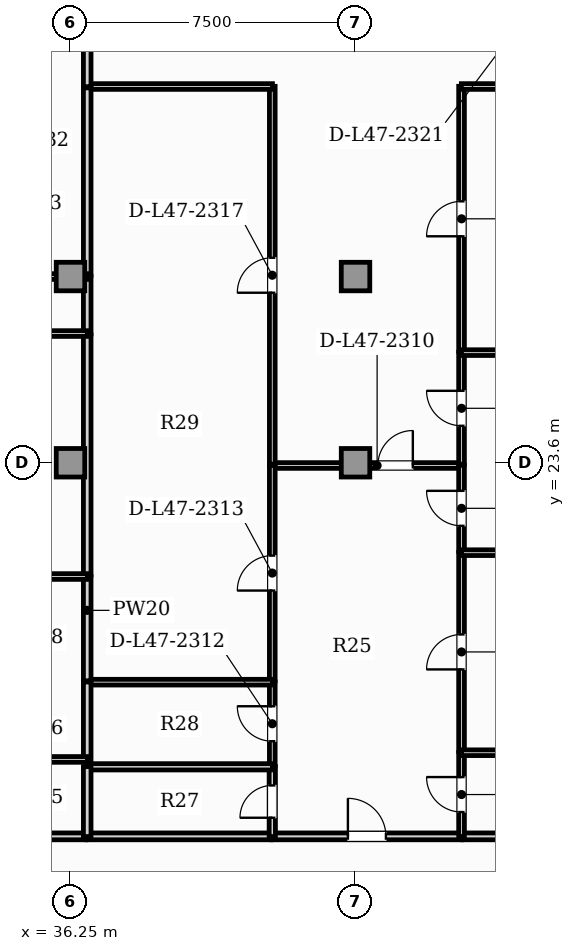
"""IFC4 building model, lengths in metres.
Left out: names, types, materials, properties, quantities, classifications, styles, units other than length and angle.
Written with IfcOpenShell. Run it as: python <this file> out.ifc"""

import sys

from ifc_helpers import new_model, si_unit, direction, frame, frame_2d, origin, origin_2d, place, context, subcontext, project, spatial, rectangle, extrude, element, fill, save


model = new_model("IFC4")
c1 = context("Model", 3, precision=1e-05, world=origin(), true_north=direction((0.0, 1.0)))
c2 = subcontext(c1, "Body", "Model", "MODEL_VIEW")
j1 = project(units=[si_unit("LENGTHUNIT", "METRE"), si_unit("PLANEANGLEUNIT", "RADIAN")], contexts=[c1])
p1 = place(None, origin())
s1 = spatial("IfcSite", under=j1, at=p1, CompositionType="ELEMENT")
p2 = place(p1, origin())
s2 = spatial("IfcBuilding", under=s1, at=p2, CompositionType="ELEMENT")
p3 = place(p2, frame((0.0, 0.0, 192.6)))
s3 = spatial("IfcBuildingStorey", under=s2, at=p3, CompositionType="ELEMENT", Elevation=192.6)
for number, where, z_axis, x_axis in (
    (1, (36.25, 23.6, 0.0), (0.0, 0.0, 1.0), (1.0, 0.0, 0.0)),
    (2, (43.75, 23.6, 0.0), (0.0, 0.0, 1.0), (1.0, 0.0, 0.0)),
    (3, (36.25, 28.5, 0.0), (0.0, 0.0, 1.0), (1.0, 0.0, 0.0)),
    (4, (43.75, 28.5, 0.0), (0.0, 0.0, 1.0), (1.0, 0.0, 0.0)),
):
    element("IfcColumn", number, at=place(p3, frame(where, z_axis=z_axis, x_axis=x_axis)), inside=s3, PredefinedType="COLUMN", context=c2, shape_type="SweptSolid", body=[
        extrude(rectangle(XDim=0.75, YDim=0.75, at=origin_2d()), origin(), (0.0, 0.0, 1.0), 3.85),
    ])
p4 = place(p3, frame((41.555, 13.77, 0.0), z_axis=(0.0, 0.0, 1.0), x_axis=(1.0, 0.0, 0.0)))
e5 = element("IfcWall", 5, at=p4, inside=s3, PredefinedType="PARTITIONING", context=c2, shape_type="SweptSolid", body=[
    extrude(rectangle(XDim=4.99, YDim=0.18, at=frame_2d((2.495, 0.0))), origin(), (0.0, 0.0, 1.0), 3.63),
])
p5 = place(p4, frame((1.995, 0.0, 0.0)))
e6 = element("IfcOpeningElement", 6, at=p5, cuts=e5, PredefinedType="OPENING", context=c2, shape_type="SweptSolid", body=[
    extrude(rectangle(XDim=1.0, YDim=2.15, at=frame_2d((0.5, 1.075))), frame((0.0, 0.1, 0.0), z_axis=(0.0, -1.0, 0.0), x_axis=(1.0, 0.0, 0.0)), (0.0, 0.0, 1.0), 0.2),
])
p6 = place(p3, frame((36.685, 13.77, 0.0), z_axis=(0.0, 0.0, 1.0), x_axis=(1.0, 0.0, 0.0)))
e7 = element("IfcWall", 7, at=p6, inside=s3, PredefinedType="PARTITIONING", context=c2, shape_type="SweptSolid", body=[
    extrude(rectangle(XDim=4.84, YDim=0.18, at=frame_2d((2.42, 0.0))), origin(), (0.0, 0.0, 1.0), 3.63),
])
p7 = place(p3, frame((46.575, 13.77, 0.0), z_axis=(0.0, 0.0, 1.0), x_axis=(1.0, 0.0, 0.0)))
e8 = element("IfcWall", 8, at=p7, inside=s3, PredefinedType="PARTITIONING", context=c2, shape_type="SweptSolid", body=[
    extrude(rectangle(XDim=5.553, YDim=0.18, at=frame_2d((2.776, 0.0))), origin(), (0.0, 0.0, 1.0), 3.63),
])
p8 = place(p3, frame((31.34, 13.77, 0.0), z_axis=(0.0, 0.0, 1.0), x_axis=(1.0, 0.0, 0.0)))
e9 = element("IfcWall", 9, at=p8, inside=s3, PredefinedType="PARTITIONING", context=c2, shape_type="SweptSolid", body=[
    extrude(rectangle(XDim=5.315, YDim=0.18, at=frame_2d((2.657, 0.0))), origin(), (0.0, 0.0, 1.0), 3.63),
])
p9 = place(p3, frame((41.555, 23.528, 0.0), z_axis=(0.0, 0.0, 1.0), x_axis=(1.0, 0.0, 0.0)))
e10 = element("IfcWall", 10, at=p9, inside=s3, PredefinedType="PARTITIONING", context=c2, shape_type="SweptSolid", body=[
    extrude(rectangle(XDim=4.99, YDim=0.15, at=frame_2d((2.495, 0.0))), origin(), (0.0, 0.0, 1.0), 3.085),
])
p10 = place(p9, frame((2.783, 0.0, 0.0)))
e11 = element("IfcOpeningElement", 11, at=p10, cuts=e10, PredefinedType="OPENING", context=c2, shape_type="SweptSolid", body=[
    extrude(rectangle(XDim=0.92, YDim=2.1, at=frame_2d((0.46, 1.05))), frame((0.0, 0.085, 0.0), z_axis=(0.0, -1.0, 0.0), x_axis=(1.0, 0.0, 0.0)), (0.0, 0.0, 1.0), 0.17),
])
p11 = place(p3, frame((41.56, 13.765, 0.0), z_axis=(0.0, 0.0, 1.0), x_axis=(0.0, 1.0, 0.0)))
e12 = element("IfcWall", 12, at=p11, inside=s3, PredefinedType="PLUMBINGWALL", context=c2, shape_type="SweptSolid", body=[
    extrude(rectangle(XDim=1.84, YDim=0.165, at=frame_2d((0.92, 0.0))), origin(), (0.0, 0.0, 1.0), 3.63),
])
p12 = place(p11, frame((0.495, 0.0, 0.0)))
e13 = element("IfcOpeningElement", 13, at=p12, cuts=e12, PredefinedType="OPENING", context=c2, shape_type="SweptSolid", body=[
    extrude(rectangle(XDim=0.85, YDim=2.1, at=frame_2d((0.425, 1.05))), frame((0.0, 0.093, 0.0), z_axis=(0.0, -1.0, 0.0), x_axis=(1.0, 0.0, 0.0)), (0.0, 0.0, 1.0), 0.185),
])
p13 = place(p3, frame((41.56, 15.635, 0.0), z_axis=(0.0, 0.0, 1.0), x_axis=(0.0, 1.0, 0.0)))
e14 = element("IfcWall", 14, at=p13, inside=s3, PredefinedType="PARTITIONING", context=c2, shape_type="SweptSolid", body=[
    extrude(rectangle(XDim=2.197, YDim=0.15, at=frame_2d((1.099, 0.0))), origin(), (0.0, 0.0, 1.0), 3.63),
])
p14 = place(p13, frame((0.639, 0.0, 0.0)))
e15 = element("IfcOpeningElement", 15, at=p14, cuts=e14, PredefinedType="OPENING", context=c2, shape_type="SweptSolid", body=[
    extrude(rectangle(XDim=0.92, YDim=2.1, at=frame_2d((0.46, 1.05))), frame((0.0, 0.085, 0.0), z_axis=(0.0, -1.0, 0.0), x_axis=(1.0, 0.0, 0.0)), (0.0, 0.0, 1.0), 0.17),
])
p15 = place(p3, frame((41.56, 17.862, 0.0), z_axis=(0.0, 0.0, 1.0), x_axis=(0.0, 1.0, 0.0)))
e16 = element("IfcWall", 16, at=p15, inside=s3, PredefinedType="PARTITIONING", context=c2, shape_type="SweptSolid", body=[
    extrude(rectangle(XDim=5.671, YDim=0.15, at=frame_2d((2.835, 0.0))), origin(), (0.0, 0.0, 1.0), 3.63),
])
p16 = place(p15, frame((2.375, 0.0, 0.0)))
e17 = element("IfcOpeningElement", 17, at=p16, cuts=e16, PredefinedType="OPENING", context=c2, shape_type="SweptSolid", body=[
    extrude(rectangle(XDim=0.92, YDim=2.1, at=frame_2d((0.46, 1.05))), frame((0.0, 0.085, 0.0), z_axis=(0.0, -1.0, 0.0), x_axis=(1.0, 0.0, 0.0)), (0.0, 0.0, 1.0), 0.17),
])
p17 = place(p3, frame((46.54, 13.765, 0.0), z_axis=(0.0, 0.0, 1.0), x_axis=(0.0, 1.0, 0.0)))
e18 = element("IfcWall", 18, at=p17, inside=s3, PredefinedType="PARTITIONING", context=c2, shape_type="SweptSolid", body=[
    extrude(rectangle(XDim=2.211, YDim=0.15, at=frame_2d((1.105, 0.0))), origin(), (0.0, 0.0, 1.0), 3.63),
])
p18 = place(p17, frame((0.646, 0.0, 0.0)))
e19 = element("IfcOpeningElement", 19, at=p18, cuts=e18, PredefinedType="OPENING", context=c2, shape_type="SweptSolid", body=[
    extrude(rectangle(XDim=0.92, YDim=2.1, at=frame_2d((0.46, 1.05))), frame((0.0, 0.085, 0.0), z_axis=(0.0, -1.0, 0.0), x_axis=(1.0, 0.0, 0.0)), (0.0, 0.0, 1.0), 0.17),
])
p19 = place(p3, frame((46.54, 16.006, 0.0), z_axis=(0.0, 0.0, 1.0), x_axis=(0.0, 1.0, 0.0)))
e20 = element("IfcWall", 20, at=p19, inside=s3, PredefinedType="PARTITIONING", context=c2, shape_type="SweptSolid", body=[
    extrude(rectangle(XDim=5.234, YDim=0.15, at=frame_2d((2.617, 0.0))), origin(), (0.0, 0.0, 1.0), 3.63),
])
p20 = place(p19, frame((2.157, 0.0, 0.0)))
e21 = element("IfcOpeningElement", 21, at=p20, cuts=e20, PredefinedType="OPENING", context=c2, shape_type="SweptSolid", body=[
    extrude(rectangle(XDim=0.92, YDim=2.1, at=frame_2d((0.46, 1.05))), frame((0.0, 0.085, 0.0), z_axis=(0.0, -1.0, 0.0), x_axis=(1.0, 0.0, 0.0)), (0.0, 0.0, 1.0), 0.17),
])
p21 = place(p3, frame((46.54, 21.27, 0.0), z_axis=(0.0, 0.0, 1.0), x_axis=(0.0, 1.0, 0.0)))
e22 = element("IfcWall", 22, at=p21, inside=s3, PredefinedType="PARTITIONING", context=c2, shape_type="SweptSolid", body=[
    extrude(rectangle(XDim=2.264, YDim=0.15, at=frame_2d((1.132, 0.0))), origin(), (0.0, 0.0, 1.0), 3.63),
])
p22 = place(p21, frame((0.672, 0.0, 0.0)))
e23 = element("IfcOpeningElement", 23, at=p22, cuts=e22, PredefinedType="OPENING", context=c2, shape_type="SweptSolid", body=[
    extrude(rectangle(XDim=0.92, YDim=2.1, at=frame_2d((0.46, 1.05))), frame((0.0, 0.085, 0.0), z_axis=(0.0, -1.0, 0.0), x_axis=(1.0, 0.0, 0.0)), (0.0, 0.0, 1.0), 0.17),
])
p23 = place(p3, frame((41.56, 23.563, 0.0), z_axis=(0.0, 0.0, 1.0), x_axis=(0.0, 1.0, 0.0)))
e24 = element("IfcWall", 24, at=p23, inside=s3, PredefinedType="PARTITIONING", context=c2, shape_type="SweptSolid", body=[
    extrude(rectangle(XDim=9.942, YDim=0.15, at=frame_2d((4.971, 0.0))), origin(), (0.0, 0.0, 1.0), 3.63),
])
p24 = place(p23, frame((4.511, 0.0, 0.0)))
e25 = element("IfcOpeningElement", 25, at=p24, cuts=e24, PredefinedType="OPENING", context=c2, shape_type="SweptSolid", body=[
    extrude(rectangle(XDim=0.92, YDim=2.1, at=frame_2d((0.46, 1.05))), frame((0.0, 0.085, 0.0), z_axis=(0.0, -1.0, 0.0), x_axis=(1.0, 0.0, 0.0)), (0.0, 0.0, 1.0), 0.17),
])
p25 = place(p3, frame((36.685, 33.5, 0.0), z_axis=(0.0, 0.0, 1.0), x_axis=(1.0, 0.0, 0.0)))
e26 = element("IfcWall", 26, at=p25, inside=s3, PredefinedType="PARTITIONING", context=c2, shape_type="SweptSolid", body=[
    extrude(rectangle(XDim=4.88, YDim=0.15, at=frame_2d((2.44, 0.0))), origin(), (0.0, 0.0, 1.0), 3.63),
])
p26 = place(p3, frame((46.54, 23.563, 0.0), z_axis=(0.0, 0.0, 1.0), x_axis=(0.0, 1.0, 0.0)))
e27 = element("IfcWall", 27, at=p26, inside=s3, PredefinedType="PARTITIONING", context=c2, shape_type="SweptSolid", body=[
    extrude(rectangle(XDim=2.94, YDim=0.15, at=frame_2d((1.47, 0.0))), origin(), (0.0, 0.0, 1.0), 3.63),
])
p27 = place(p26, frame((1.01, 0.0, 0.0)))
e28 = element("IfcOpeningElement", 28, at=p27, cuts=e27, PredefinedType="OPENING", context=c2, shape_type="SweptSolid", body=[
    extrude(rectangle(XDim=0.92, YDim=2.1, at=frame_2d((0.46, 1.05))), frame((0.0, 0.085, 0.0), z_axis=(0.0, -1.0, 0.0), x_axis=(1.0, 0.0, 0.0)), (0.0, 0.0, 1.0), 0.17),
])
p28 = place(p3, frame((46.54, 26.533, 0.0), z_axis=(0.0, 0.0, 1.0), x_axis=(0.0, 1.0, 0.0)))
e29 = element("IfcWall", 29, at=p28, inside=s3, PredefinedType="PARTITIONING", context=c2, shape_type="SweptSolid", body=[
    extrude(rectangle(XDim=6.972, YDim=0.15, at=frame_2d((3.486, 0.0))), origin(), (0.0, 0.0, 1.0), 3.63),
])
p29 = place(p28, frame((3.026, 0.0, 0.0)))
e30 = element("IfcOpeningElement", 30, at=p29, cuts=e29, PredefinedType="OPENING", context=c2, shape_type="SweptSolid", body=[
    extrude(rectangle(XDim=0.92, YDim=2.1, at=frame_2d((0.46, 1.05))), frame((0.0, 0.085, 0.0), z_axis=(0.0, -1.0, 0.0), x_axis=(1.0, 0.0, 0.0)), (0.0, 0.0, 1.0), 0.17),
])
p30 = place(p3, frame((46.535, 33.5, 0.0), z_axis=(0.0, 0.0, 1.0), x_axis=(1.0, 0.0, 0.0)))
e31 = element("IfcWall", 31, at=p30, inside=s3, PredefinedType="PARTITIONING", context=c2, shape_type="SweptSolid", body=[
    extrude(rectangle(XDim=5.593, YDim=0.15, at=frame_2d((2.796, 0.0))), origin(), (0.0, 0.0, 1.0), 3.63),
])
p31 = place(p3, frame((36.69, 33.495, 0.0), z_axis=(0.0, 0.0, 1.0), x_axis=(0.0, 1.0, 0.0)))
e32 = element("IfcWall", 32, at=p31, inside=s3, PredefinedType="PARTITIONING", context=c2, shape_type="SweptSolid", body=[
    extrude(rectangle(XDim=2.638, YDim=0.2, at=frame_2d((1.319, 0.0))), origin(), (0.0, 0.0, 1.0), 3.63),
])
p32 = place(p3, frame((36.685, 15.6, 0.0), z_axis=(0.0, 0.0, 1.0), x_axis=(1.0, 0.0, 0.0)))
e33 = element("IfcWall", 33, at=p32, inside=s3, PredefinedType="PLUMBINGWALL", context=c2, shape_type="SweptSolid", body=[
    extrude(rectangle(XDim=4.88, YDim=0.165, at=frame_2d((2.44, 0.0))), origin(), (0.0, 0.0, 1.0), 3.63),
])
p33 = place(p3, frame((36.69, 13.765, 0.0), z_axis=(0.0, 0.0, 1.0), x_axis=(0.0, 1.0, 0.0)))
e34 = element("IfcWall", 34, at=p33, inside=s3, PredefinedType="PARTITIONING", context=c2, shape_type="SweptSolid", body=[
    extrude(rectangle(XDim=1.84, YDim=0.2, at=frame_2d((0.92, 0.0))), origin(), (0.0, 0.0, 1.0), 3.63),
])
p34 = place(p3, frame((36.685, 17.827, 0.0), z_axis=(0.0, 0.0, 1.0), x_axis=(1.0, 0.0, 0.0)))
e35 = element("IfcWall", 35, at=p34, inside=s3, PredefinedType="PARTITIONING", context=c2, shape_type="SweptSolid", body=[
    extrude(rectangle(XDim=4.88, YDim=0.15, at=frame_2d((2.44, 0.0))), origin(), (0.0, 0.0, 1.0), 3.63),
])
p35 = place(p3, frame((36.69, 15.79, 0.0), z_axis=(0.0, 0.0, 1.0), x_axis=(0.0, 1.0, 0.0)))
e36 = element("IfcWall", 36, at=p35, inside=s3, PredefinedType="PARTITIONING", context=c2, shape_type="SweptSolid", body=[
    extrude(rectangle(XDim=2.042, YDim=0.2, at=frame_2d((1.021, 0.0))), origin(), (0.0, 0.0, 1.0), 3.63),
])
p36 = place(p3, frame((36.69, 26.995, 0.0), z_axis=(0.0, 0.0, 1.0), x_axis=(0.0, 1.0, 0.0)))
e37 = element("IfcWall", 37, at=p36, inside=s3, PredefinedType="PARTITIONING", context=c2, shape_type="SweptSolid", body=[
    extrude(rectangle(XDim=1.51, YDim=0.2, at=frame_2d((0.755, 0.0))), origin(), (0.0, 0.0, 1.0), 3.63),
])
p37 = place(p3, frame((36.69, 17.862, 0.0), z_axis=(0.0, 0.0, 1.0), x_axis=(0.0, 1.0, 0.0)))
e38 = element("IfcWall", 38, at=p37, inside=s3, PredefinedType="PARTITIONING", context=c2, shape_type="SweptSolid", body=[
    extrude(rectangle(XDim=2.75, YDim=0.2, at=frame_2d((1.375, 0.0))), origin(), (0.0, 0.0, 1.0), 3.63),
])
p38 = place(p3, frame((36.69, 20.642, 0.0), z_axis=(0.0, 0.0, 1.0), x_axis=(0.0, 1.0, 0.0)))
e39 = element("IfcWall", 39, at=p38, inside=s3, PredefinedType="PARTITIONING", context=c2, shape_type="SweptSolid", body=[
    extrude(rectangle(XDim=6.323, YDim=0.2, at=frame_2d((3.162, 0.0))), origin(), (0.0, 0.0, 1.0), 3.63),
])
p39 = place(p3, frame((36.69, 28.535, 0.0), z_axis=(0.0, 0.0, 1.0), x_axis=(0.0, 1.0, 0.0)))
e40 = element("IfcWall", 40, at=p39, inside=s3, PredefinedType="PARTITIONING", context=c2, shape_type="SweptSolid", body=[
    extrude(rectangle(XDim=4.93, YDim=0.2, at=frame_2d((2.465, 0.0))), origin(), (0.0, 0.0, 1.0), 3.63),
])
for number, where, z_axis, x_axis in (
    (41, (46.535, 15.971, 0.0), (0.0, 0.0, 1.0), (1.0, 0.0, 0.0)),
    (42, (46.535, 21.235, 0.0), (0.0, 0.0, 1.0), (1.0, 0.0, 0.0)),
    (43, (46.535, 26.498, 0.0), (0.0, 0.0, 1.0), (1.0, 0.0, 0.0)),
):
    element("IfcWall", number, at=place(p3, frame(where, z_axis=z_axis, x_axis=x_axis)), inside=s3, PredefinedType="PARTITIONING", context=c2, shape_type="SweptSolid", body=[
        extrude(rectangle(XDim=5.593, YDim=0.15, at=frame_2d((2.796, 0.0))), origin(), (0.0, 0.0, 1.0), 3.63),
    ])
p40 = place(p3, frame((31.3, 27.0, 0.0), z_axis=(0.0, 0.0, 1.0), x_axis=(1.0, 0.0, 0.0)))
e44 = element("IfcWall", 44, at=p40, inside=s3, PredefinedType="PARTITIONING", context=c2, shape_type="SweptSolid", body=[
    extrude(rectangle(XDim=5.395, YDim=0.15, at=frame_2d((2.697, 0.0))), origin(), (0.0, 0.0, 1.0), 3.63),
])
p41 = place(p3, frame((32.281, 28.5, 0.0), z_axis=(0.0, 0.0, 1.0), x_axis=(1.0, 0.0, 0.0)))
e45 = element("IfcWall", 45, at=p41, inside=s3, PredefinedType="PARTITIONING", context=c2, shape_type="SweptSolid", body=[
    extrude(rectangle(XDim=4.414, YDim=0.15, at=frame_2d((2.207, 0.0))), origin(), (0.0, 0.0, 1.0), 3.63),
])
p42 = place(p41, frame((1.747, 0.0, 0.0)))
e46 = element("IfcOpeningElement", 46, at=p42, cuts=e45, PredefinedType="OPENING", context=c2, shape_type="SweptSolid", body=[
    extrude(rectangle(XDim=0.92, YDim=2.1, at=frame_2d((0.46, 1.05))), frame((0.0, 0.085, 0.0), z_axis=(0.0, -1.0, 0.0), x_axis=(1.0, 0.0, 0.0)), (0.0, 0.0, 1.0), 0.17),
])
for number, where, z_axis, x_axis in (
    (47, (31.3, 15.794, 0.0), (0.0, 0.0, 1.0), (1.0, 0.0, 0.0)),
    (48, (31.3, 20.607, 0.0), (0.0, 0.0, 1.0), (1.0, 0.0, 0.0)),
):
    element("IfcWall", number, at=place(p3, frame(where, z_axis=z_axis, x_axis=x_axis)), inside=s3, PredefinedType="PARTITIONING", context=c2, shape_type="SweptSolid", body=[
        extrude(rectangle(XDim=5.395, YDim=0.15, at=frame_2d((2.697, 0.0))), origin(), (0.0, 0.0, 1.0), 3.63),
    ])
p43 = place(p5, origin())
e49 = element("IfcDoor", 49, at=p43, inside=s3, OperationType="SINGLE_SWING_LEFT", PredefinedType="DOOR", context=c2, shape_type="SweptSolid", body=[
    extrude(rectangle(XDim=1.0, YDim=2.15, at=frame_2d((0.5, 1.075))), frame((0.0, 0.025, 0.0), z_axis=(0.0, -1.0, 0.0), x_axis=(1.0, 0.0, 0.0)), (0.0, 0.0, 1.0), 0.05),
])
fill(e6, e49)
p44 = place(p10, origin())
e50 = element("IfcDoor", 50, at=p44, inside=s3, OperationType="SINGLE_SWING_RIGHT", PredefinedType="DOOR", context=c2, shape_type="SweptSolid", body=[
    extrude(rectangle(XDim=0.92, YDim=2.1, at=frame_2d((0.46, 1.05))), frame((0.0, 0.025, 0.0), z_axis=(0.0, -1.0, 0.0), x_axis=(1.0, 0.0, 0.0)), (0.0, 0.0, 1.0), 0.05),
])
fill(e11, e50)
p45 = place(p12, origin())
e51 = element("IfcDoor", 51, at=p45, inside=s3, OperationType="SINGLE_SWING_LEFT", PredefinedType="DOOR", context=c2, shape_type="SweptSolid", body=[
    extrude(rectangle(XDim=0.85, YDim=2.1, at=frame_2d((0.425, 1.05))), frame((0.0, 0.025, 0.0), z_axis=(0.0, -1.0, 0.0), x_axis=(1.0, 0.0, 0.0)), (0.0, 0.0, 1.0), 0.05),
])
fill(e13, e51)
p46 = place(p14, origin())
e52 = element("IfcDoor", 52, at=p46, inside=s3, OperationType="SINGLE_SWING_RIGHT", PredefinedType="DOOR", context=c2, shape_type="SweptSolid", body=[
    extrude(rectangle(XDim=0.92, YDim=2.1, at=frame_2d((0.46, 1.05))), frame((0.0, 0.025, 0.0), z_axis=(0.0, -1.0, 0.0), x_axis=(1.0, 0.0, 0.0)), (0.0, 0.0, 1.0), 0.05),
])
fill(e15, e52)
p47 = place(p16, origin())
e53 = element("IfcDoor", 53, at=p47, inside=s3, OperationType="SINGLE_SWING_LEFT", PredefinedType="DOOR", context=c2, shape_type="SweptSolid", body=[
    extrude(rectangle(XDim=0.92, YDim=2.1, at=frame_2d((0.46, 1.05))), frame((0.0, 0.025, 0.0), z_axis=(0.0, -1.0, 0.0), x_axis=(1.0, 0.0, 0.0)), (0.0, 0.0, 1.0), 0.05),
])
fill(e17, e53)
p48 = place(p18, origin())
e54 = element("IfcDoor", 54, at=p48, inside=s3, OperationType="SINGLE_SWING_RIGHT", PredefinedType="DOOR", context=c2, shape_type="SweptSolid", body=[
    extrude(rectangle(XDim=0.92, YDim=2.1, at=frame_2d((0.46, 1.05))), frame((0.0, 0.025, 0.0), z_axis=(0.0, -1.0, 0.0), x_axis=(1.0, 0.0, 0.0)), (0.0, 0.0, 1.0), 0.05),
])
fill(e19, e54)
p49 = place(p20, origin())
e55 = element("IfcDoor", 55, at=p49, inside=s3, OperationType="SINGLE_SWING_LEFT", PredefinedType="DOOR", context=c2, shape_type="SweptSolid", body=[
    extrude(rectangle(XDim=0.92, YDim=2.1, at=frame_2d((0.46, 1.05))), frame((0.0, 0.025, 0.0), z_axis=(0.0, -1.0, 0.0), x_axis=(1.0, 0.0, 0.0)), (0.0, 0.0, 1.0), 0.05),
])
fill(e21, e55)
p50 = place(p22, origin())
e56 = element("IfcDoor", 56, at=p50, inside=s3, OperationType="SINGLE_SWING_RIGHT", PredefinedType="DOOR", context=c2, shape_type="SweptSolid", body=[
    extrude(rectangle(XDim=0.92, YDim=2.1, at=frame_2d((0.46, 1.05))), frame((0.0, 0.025, 0.0), z_axis=(0.0, -1.0, 0.0), x_axis=(1.0, 0.0, 0.0)), (0.0, 0.0, 1.0), 0.05),
])
fill(e23, e56)
p51 = place(p24, origin())
e57 = element("IfcDoor", 57, at=p51, inside=s3, OperationType="SINGLE_SWING_LEFT", PredefinedType="DOOR", context=c2, shape_type="SweptSolid", body=[
    extrude(rectangle(XDim=0.92, YDim=2.1, at=frame_2d((0.46, 1.05))), frame((0.0, 0.025, 0.0), z_axis=(0.0, -1.0, 0.0), x_axis=(1.0, 0.0, 0.0)), (0.0, 0.0, 1.0), 0.05),
])
fill(e25, e57)
p52 = place(p27, origin())
e58 = element("IfcDoor", 58, at=p52, inside=s3, OperationType="SINGLE_SWING_RIGHT", PredefinedType="DOOR", context=c2, shape_type="SweptSolid", body=[
    extrude(rectangle(XDim=0.92, YDim=2.1, at=frame_2d((0.46, 1.05))), frame((0.0, 0.025, 0.0), z_axis=(0.0, -1.0, 0.0), x_axis=(1.0, 0.0, 0.0)), (0.0, 0.0, 1.0), 0.05),
])
fill(e28, e58)
p53 = place(p29, origin())
e59 = element("IfcDoor", 59, at=p53, inside=s3, OperationType="SINGLE_SWING_LEFT", PredefinedType="DOOR", context=c2, shape_type="SweptSolid", body=[
    extrude(rectangle(XDim=0.92, YDim=2.1, at=frame_2d((0.46, 1.05))), frame((0.0, 0.025, 0.0), z_axis=(0.0, -1.0, 0.0), x_axis=(1.0, 0.0, 0.0)), (0.0, 0.0, 1.0), 0.05),
])
fill(e30, e59)
save(model, sys.argv[1])
